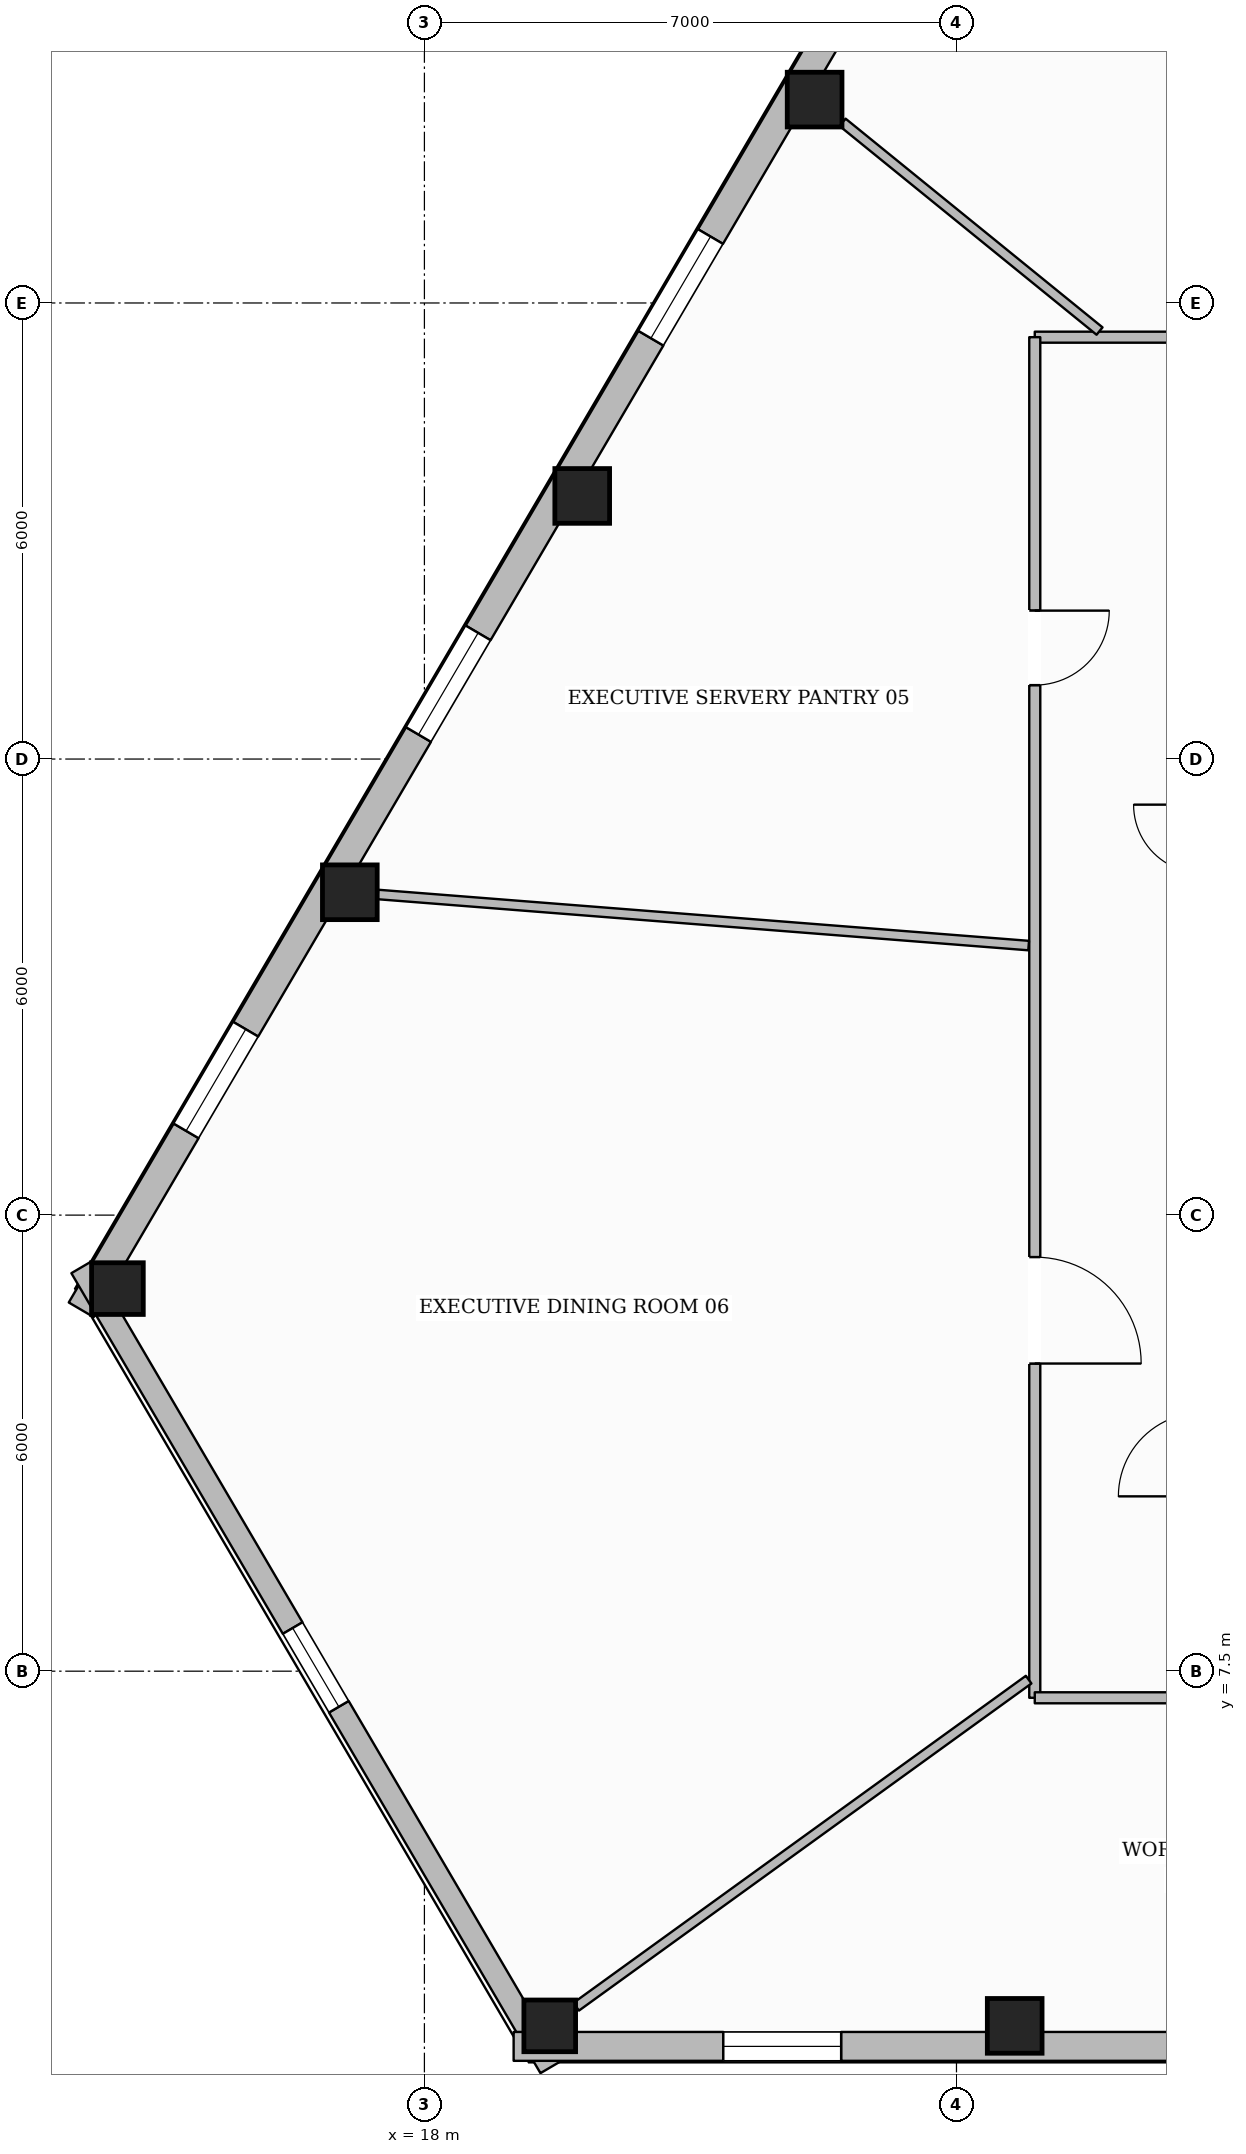
"""IFC4 building model, lengths in metres.
Left out: names, types, materials, properties, quantities, classifications, styles, units other than length and angle.
Written with IfcOpenShell. Run it as: python <this file> out.ifc"""

import sys

from ifc_helpers import new_model, si_unit, direction, frame, frame_2d, origin, origin_2d, place, context, subcontext, project, spatial, rectangle, hollow_rectangle, extrude, element, fill, save


model = new_model("IFC4")
c1 = context("Model", 3, precision=1e-05, world=origin(), true_north=direction((0.0, 1.0)))
c2 = subcontext(c1, "Body", "Model", "MODEL_VIEW")
j1 = project(units=[si_unit("LENGTHUNIT", "METRE"), si_unit("PLANEANGLEUNIT", "RADIAN")], contexts=[c1])
p1 = place(None, origin())
s1 = spatial("IfcSite", under=j1, at=p1, CompositionType="ELEMENT")
p2 = place(p1, origin())
s2 = spatial("IfcBuilding", under=s1, at=p2, CompositionType="ELEMENT")
p3 = place(p2, frame((0.0, 0.0, 131.7)))
s3 = spatial("IfcBuildingStorey", under=s2, at=p3, CompositionType="ELEMENT", Elevation=131.7)
for number, where, z_axis, x_axis in (
    (1, (23.134, 28.176, 0.0), (0.0, 0.0, 1.0), (1.0, 0.0, 0.0)),
    (2, (20.076, 22.961, 0.0), (0.0, 0.0, 1.0), (1.0, 0.0, 0.0)),
    (3, (17.019, 17.747, 0.0), (0.0, 0.0, 1.0), (1.0, 0.0, 0.0)),
):
    element("IfcColumn", number, at=place(p3, frame(where, z_axis=z_axis, x_axis=x_axis)), inside=s3, PredefinedType="COLUMN", context=c2, shape_type="SweptSolid", body=[
        extrude(hollow_rectangle(XDim=0.72, YDim=0.72, WallThickness=0.032, at=origin_2d()), origin(), (0.0, 0.0, 1.0), 3.6),
    ])
for number, where, z_axis, x_axis in (
    (4, (13.961, 12.533, 0.0), (0.0, 0.0, 1.0), (1.0, 0.0, 0.0)),
    (5, (19.649, 2.834, 0.0), (0.0, 0.0, 1.0), (1.0, 0.0, 0.0)),
):
    element("IfcColumn", number, at=place(p3, frame(where, z_axis=z_axis, x_axis=x_axis)), inside=s3, PredefinedType="COLUMN", context=c2, shape_type="SweptSolid", body=[
        extrude(hollow_rectangle(XDim=0.68, YDim=0.68, WallThickness=0.03, at=origin_2d()), origin(), (0.0, 0.0, 1.0), 3.6),
    ])
p4 = place(p3, frame((25.766, 2.834, 0.0), z_axis=(0.0, 0.0, 1.0), x_axis=(1.0, 0.0, 0.0)))
e6 = element("IfcColumn", 6, at=p4, inside=s3, PredefinedType="COLUMN", context=c2, shape_type="SweptSolid", body=[
    extrude(hollow_rectangle(XDim=0.72, YDim=0.72, WallThickness=0.032, at=origin_2d()), origin(), (0.0, 0.0, 1.0), 3.6),
])
p5 = place(p3, frame((13.485, 12.254, 0.0), z_axis=(0.0, 0.0, 1.0), x_axis=(0.505829244079, 0.862633627813, 0.0)))
e7 = element("IfcWall", 7, at=p5, inside=s3, PredefinedType="STANDARD", context=c2, shape_type="SweptSolid", body=[
    extrude(rectangle(XDim=37.223, YDim=0.38, at=frame_2d((18.611, 0.0))), origin(), (0.0, 0.0, 1.0), 3.059),
])
p6 = place(p5, frame((32.951, 0.0, 0.65)))
e8 = element("IfcOpeningElement", 8, at=p6, cuts=e7, PredefinedType="OPENING", context=c2, shape_type="SweptSolid", body=[
    extrude(rectangle(XDim=1.55, YDim=1.75, at=frame_2d((0.775, 0.875))), frame((0.0, 0.2, 0.0), z_axis=(0.0, -1.0, 0.0), x_axis=(1.0, 0.0, 0.0)), (0.0, 0.0, 1.0), 0.4),
])
p7 = place(p5, frame((26.906, 0.0, 0.65)))
e9 = element("IfcOpeningElement", 9, at=p7, cuts=e7, PredefinedType="OPENING", context=c2, shape_type="SweptSolid", body=[
    extrude(rectangle(XDim=1.55, YDim=1.75, at=frame_2d((0.775, 0.875))), frame((0.0, 0.2, 0.0), z_axis=(0.0, -1.0, 0.0), x_axis=(1.0, 0.0, 0.0)), (0.0, 0.0, 1.0), 0.4),
])
p8 = place(p5, frame((14.817, 0.0, 0.65)))
e10 = element("IfcOpeningElement", 10, at=p8, cuts=e7, PredefinedType="OPENING", context=c2, shape_type="SweptSolid", body=[
    extrude(rectangle(XDim=1.55, YDim=1.75, at=frame_2d((0.775, 0.875))), frame((0.0, 0.2, 0.0), z_axis=(0.0, -1.0, 0.0), x_axis=(1.0, 0.0, 0.0)), (0.0, 0.0, 1.0), 0.4),
])
p9 = place(p5, frame((8.773, 0.0, 0.65)))
e11 = element("IfcOpeningElement", 11, at=p9, cuts=e7, PredefinedType="OPENING", context=c2, shape_type="SweptSolid", body=[
    extrude(rectangle(XDim=1.55, YDim=1.75, at=frame_2d((0.775, 0.875))), frame((0.0, 0.2, 0.0), z_axis=(0.0, -1.0, 0.0), x_axis=(1.0, 0.0, 0.0)), (0.0, 0.0, 1.0), 0.4),
])
p10 = place(p5, frame((2.729, 0.0, 0.65)))
e12 = element("IfcOpeningElement", 12, at=p10, cuts=e7, PredefinedType="OPENING", context=c2, shape_type="SweptSolid", body=[
    extrude(rectangle(XDim=1.55, YDim=1.75, at=frame_2d((0.775, 0.875))), frame((0.0, 0.2, 0.0), z_axis=(0.0, -1.0, 0.0), x_axis=(1.0, 0.0, 0.0)), (0.0, 0.0, 1.0), 0.4),
])
p11 = place(p3, frame((19.656, 2.288, 0.0), z_axis=(0.0, 0.0, 1.0), x_axis=(-0.505835558362, 0.862629925227, 0.0)))
e13 = element("IfcWall", 13, at=p11, inside=s3, PredefinedType="STANDARD", context=c2, shape_type="SweptSolid", body=[
    extrude(rectangle(XDim=12.2, YDim=0.3, at=frame_2d((6.1, 0.0))), origin(), (0.0, 0.0, 1.0), 3.059),
])
p12 = place(p11, frame((5.5, 0.0, 0.65)))
e14 = element("IfcOpeningElement", 14, at=p12, cuts=e13, PredefinedType="OPENING", context=c2, shape_type="SweptSolid", body=[
    extrude(rectangle(XDim=1.2, YDim=1.7, at=frame_2d((0.6, 0.85))), frame((0.0, 0.16, 0.0), z_axis=(0.0, -1.0, 0.0), x_axis=(1.0, 0.0, 0.0)), (0.0, 0.0, 1.0), 0.32),
])
p13 = place(p3, frame((56.826, 2.564, 0.0), z_axis=(0.0, 0.0, 1.0), x_axis=(-1.0, 0.0, 0.0)))
e15 = element("IfcWall", 15, at=p13, inside=s3, PredefinedType="STANDARD", context=c2, shape_type="SweptSolid", body=[
    extrude(rectangle(XDim=37.652, YDim=0.38, at=frame_2d((18.826, 0.0))), origin(), (0.0, 0.0, 1.0), 3.059),
])
p14 = place(p13, frame((33.344, 0.0, 0.65)))
e16 = element("IfcOpeningElement", 16, at=p14, cuts=e15, PredefinedType="OPENING", context=c2, shape_type="SweptSolid", body=[
    extrude(rectangle(XDim=1.55, YDim=1.75, at=frame_2d((0.775, 0.875))), frame((0.0, 0.2, 0.0), z_axis=(0.0, -1.0, 0.0), x_axis=(1.0, 0.0, 0.0)), (0.0, 0.0, 1.0), 0.4),
])
p15 = place(p13, frame((27.227, 0.0, 0.65)))
e17 = element("IfcOpeningElement", 17, at=p15, cuts=e15, PredefinedType="OPENING", context=c2, shape_type="SweptSolid", body=[
    extrude(rectangle(XDim=1.55, YDim=1.75, at=frame_2d((0.775, 0.875))), frame((0.0, 0.2, 0.0), z_axis=(0.0, -1.0, 0.0), x_axis=(1.0, 0.0, 0.0)), (0.0, 0.0, 1.0), 0.4),
])
p16 = place(p13, frame((14.993, 0.0, 0.65)))
e18 = element("IfcOpeningElement", 18, at=p16, cuts=e15, PredefinedType="OPENING", context=c2, shape_type="SweptSolid", body=[
    extrude(rectangle(XDim=1.55, YDim=1.75, at=frame_2d((0.775, 0.875))), frame((0.0, 0.2, 0.0), z_axis=(0.0, -1.0, 0.0), x_axis=(1.0, 0.0, 0.0)), (0.0, 0.0, 1.0), 0.4),
])
p17 = place(p13, frame((8.875, 0.0, 0.65)))
e19 = element("IfcOpeningElement", 19, at=p17, cuts=e15, PredefinedType="OPENING", context=c2, shape_type="SweptSolid", body=[
    extrude(rectangle(XDim=1.55, YDim=1.75, at=frame_2d((0.775, 0.875))), frame((0.0, 0.2, 0.0), z_axis=(0.0, -1.0, 0.0), x_axis=(1.0, 0.0, 0.0)), (0.0, 0.0, 1.0), 0.4),
])
p18 = place(p13, frame((2.759, 0.0, 0.65)))
e20 = element("IfcOpeningElement", 20, at=p18, cuts=e15, PredefinedType="OPENING", context=c2, shape_type="SweptSolid", body=[
    extrude(rectangle(XDim=1.55, YDim=1.75, at=frame_2d((0.775, 0.875))), frame((0.0, 0.2, 0.0), z_axis=(0.0, -1.0, 0.0), x_axis=(1.0, 0.0, 0.0)), (0.0, 0.0, 1.0), 0.4),
])
p19 = place(p3, frame((49.97, 25.05, 0.0), z_axis=(0.0, 0.0, 1.0), x_axis=(-1.0, 0.0, 0.0)))
e21 = element("IfcWall", 21, at=p19, inside=s3, PredefinedType="PARTITIONING", context=c2, shape_type="SweptSolid", body=[
    extrude(rectangle(XDim=23.94, YDim=0.145, at=frame_2d((11.97, 0.0))), origin(), (0.0, 0.0, 1.0), 3.6),
])
p20 = place(p19, frame((14.53, 0.0, 0.0)))
e22 = element("IfcOpeningElement", 22, at=p20, cuts=e21, PredefinedType="OPENING", context=c2, shape_type="SweptSolid", body=[
    extrude(rectangle(XDim=0.88, YDim=2.1, at=frame_2d((0.44, 1.05))), frame((0.0, 0.083, 0.0), z_axis=(0.0, -1.0, 0.0), x_axis=(1.0, 0.0, 0.0)), (0.0, 0.0, 1.0), 0.165),
])
p21 = place(p19, frame((12.01, 0.0, 0.0)))
e23 = element("IfcOpeningElement", 23, at=p21, cuts=e21, PredefinedType="OPENING", context=c2, shape_type="SweptSolid", body=[
    extrude(rectangle(XDim=0.88, YDim=2.1, at=frame_2d((0.44, 1.05))), frame((0.0, 0.083, 0.0), z_axis=(0.0, -1.0, 0.0), x_axis=(1.0, 0.0, 0.0)), (0.0, 0.0, 1.0), 0.165),
])
p22 = place(p19, frame((9.55, 0.0, 0.0)))
e24 = element("IfcOpeningElement", 24, at=p22, cuts=e21, PredefinedType="OPENING", context=c2, shape_type="SweptSolid", body=[
    extrude(rectangle(XDim=0.96, YDim=2.1, at=frame_2d((0.48, 1.05))), frame((0.0, 0.083, 0.0), z_axis=(0.0, -1.0, 0.0), x_axis=(1.0, 0.0, 0.0)), (0.0, 0.0, 1.0), 0.165),
])
p23 = place(p19, frame((2.292, 0.0, 0.0)))
e25 = element("IfcOpeningElement", 25, at=p23, cuts=e21, PredefinedType="OPENING", context=c2, shape_type="SweptSolid", body=[
    extrude(rectangle(XDim=0.98, YDim=2.15, at=frame_2d((0.49, 1.075))), frame((0.0, 0.083, 0.0), z_axis=(0.0, -1.0, 0.0), x_axis=(1.0, 0.0, 0.0)), (0.0, 0.0, 1.0), 0.165),
])
p24 = place(p19, frame((6.668, 0.0, 0.0)))
e26 = element("IfcOpeningElement", 26, at=p24, cuts=e21, PredefinedType="OPENING", context=c2, shape_type="SweptSolid", body=[
    extrude(rectangle(XDim=1.4, YDim=2.2, at=frame_2d((0.7, 1.1))), frame((0.0, 0.083, 0.0), z_axis=(0.0, -1.0, 0.0), x_axis=(1.0, 0.0, 0.0)), (0.0, 0.0, 1.0), 0.165),
])
p25 = place(p19, frame((18.901, 0.0, 0.0)))
e27 = element("IfcOpeningElement", 27, at=p25, cuts=e21, PredefinedType="OPENING", context=c2, shape_type="SweptSolid", body=[
    extrude(rectangle(XDim=1.4, YDim=2.2, at=frame_2d((0.7, 1.1))), frame((0.0, 0.083, 0.0), z_axis=(0.0, -1.0, 0.0), x_axis=(1.0, 0.0, 0.0)), (0.0, 0.0, 1.0), 0.165),
])
p26 = place(p3, frame((26.03, 25.05, 0.0), z_axis=(0.0, 0.0, 1.0), x_axis=(0.0, -1.0, 0.0)))
e28 = element("IfcWall", 28, at=p26, inside=s3, PredefinedType="PARTITIONING", context=c2, shape_type="SweptSolid", body=[
    extrude(rectangle(XDim=17.9, YDim=0.145, at=frame_2d((8.95, 0.0))), origin(), (0.0, 0.0, 1.0), 3.288),
])
p27 = place(p26, frame((3.597, 0.0, 0.0)))
e29 = element("IfcOpeningElement", 29, at=p27, cuts=e28, PredefinedType="OPENING", context=c2, shape_type="SweptSolid", body=[
    extrude(rectangle(XDim=0.98, YDim=2.15, at=frame_2d((0.49, 1.075))), frame((0.0, 0.083, 0.0), z_axis=(0.0, -1.0, 0.0), x_axis=(1.0, 0.0, 0.0)), (0.0, 0.0, 1.0), 0.165),
])
p28 = place(p26, frame((12.103, 0.0, 0.0)))
e30 = element("IfcOpeningElement", 30, at=p28, cuts=e28, PredefinedType="OPENING", context=c2, shape_type="SweptSolid", body=[
    extrude(rectangle(XDim=1.4, YDim=2.2, at=frame_2d((0.7, 1.1))), frame((0.0, 0.083, 0.0), z_axis=(0.0, -1.0, 0.0), x_axis=(1.0, 0.0, 0.0)), (0.0, 0.0, 1.0), 0.165),
])
p29 = place(p3, frame((26.03, 7.15, 0.0), z_axis=(0.0, 0.0, 1.0), x_axis=(1.0, 0.0, 0.0)))
e31 = element("IfcWall", 31, at=p29, inside=s3, PredefinedType="PARTITIONING", context=c2, shape_type="SweptSolid", body=[
    extrude(rectangle(XDim=23.94, YDim=0.145, at=frame_2d((11.97, 0.0))), origin(), (0.0, 0.0, 1.0), 3.6),
])
p30 = place(p29, frame((7.452, 0.0, 0.0)))
e32 = element("IfcOpeningElement", 32, at=p30, cuts=e31, PredefinedType="OPENING", context=c2, shape_type="SweptSolid", body=[
    extrude(rectangle(XDim=1.4, YDim=2.2, at=frame_2d((0.7, 1.1))), frame((0.0, 0.083, 0.0), z_axis=(0.0, -1.0, 0.0), x_axis=(1.0, 0.0, 0.0)), (0.0, 0.0, 1.0), 0.165),
])
p31 = place(p29, frame((19.642, 0.0, 0.0)))
e33 = element("IfcOpeningElement", 33, at=p31, cuts=e31, PredefinedType="OPENING", context=c2, shape_type="SweptSolid", body=[
    extrude(rectangle(XDim=1.02, YDim=2.15, at=frame_2d((0.51, 1.075))), frame((0.0, 0.083, 0.0), z_axis=(0.0, -1.0, 0.0), x_axis=(1.0, 0.0, 0.0)), (0.0, 0.0, 1.0), 0.165),
])
p32 = place(p3, frame((26.882, 25.131, 0.0), z_axis=(0.0, 0.0, 1.0), x_axis=(-0.776187723066, 0.630501878317, 0.0)))
e34 = element("IfcWall", 34, at=p32, inside=s3, PredefinedType="PARTITIONING", context=c2, shape_type="SweptSolid", body=[
    extrude(rectangle(XDim=4.355, YDim=0.125, at=frame_2d((2.178, 0.0))), origin(), (0.0, 0.0, 1.0), 3.141),
])
p33 = place(p3, frame((25.949, 17.046, 0.0), z_axis=(0.0, 0.0, 1.0), x_axis=(-0.996931335541, 0.078280982467, 0.0)))
e35 = element("IfcWall", 35, at=p33, inside=s3, PredefinedType="PARTITIONING", context=c2, shape_type="SweptSolid", body=[
    extrude(rectangle(XDim=8.589, YDim=0.125, at=frame_2d((4.294, 0.0))), origin(), (0.0, 0.0, 1.0), 3.141),
])
p34 = place(p3, frame((25.949, 7.389, 0.0), z_axis=(0.0, 0.0, 1.0), x_axis=(-0.810414453305, -0.585856990975, 0.0)))
e36 = element("IfcWall", 36, at=p34, inside=s3, PredefinedType="PARTITIONING", context=c2, shape_type="SweptSolid", body=[
    extrude(rectangle(XDim=7.345, YDim=0.125, at=frame_2d((3.673, 0.0))), origin(), (0.0, 0.0, 1.0), 3.141),
])
p35 = place(p8, origin())
e37 = element("IfcWindow", 37, at=p35, inside=s3, PartitioningType="SINGLE_PANEL", PredefinedType="WINDOW", context=c2, shape_type="SweptSolid", body=[
    extrude(rectangle(XDim=1.55, YDim=1.75, at=frame_2d((0.775, 0.875))), frame((0.0, 0.03, 0.0), z_axis=(0.0, -1.0, 0.0), x_axis=(1.0, 0.0, 0.0)), (0.0, 0.0, 1.0), 0.06),
])
fill(e10, e37)
p36 = place(p9, origin())
e38 = element("IfcWindow", 38, at=p36, inside=s3, PartitioningType="SINGLE_PANEL", PredefinedType="WINDOW", context=c2, shape_type="SweptSolid", body=[
    extrude(rectangle(XDim=1.55, YDim=1.75, at=frame_2d((0.775, 0.875))), frame((0.0, 0.03, 0.0), z_axis=(0.0, -1.0, 0.0), x_axis=(1.0, 0.0, 0.0)), (0.0, 0.0, 1.0), 0.06),
])
fill(e11, e38)
p37 = place(p10, origin())
e39 = element("IfcWindow", 39, at=p37, inside=s3, PartitioningType="SINGLE_PANEL", PredefinedType="WINDOW", context=c2, shape_type="SweptSolid", body=[
    extrude(rectangle(XDim=1.55, YDim=1.75, at=frame_2d((0.775, 0.875))), frame((0.0, 0.03, 0.0), z_axis=(0.0, -1.0, 0.0), x_axis=(1.0, 0.0, 0.0)), (0.0, 0.0, 1.0), 0.06),
])
fill(e12, e39)
p38 = place(p14, origin())
e40 = element("IfcWindow", 40, at=p38, inside=s3, PartitioningType="SINGLE_PANEL", PredefinedType="WINDOW", context=c2, shape_type="SweptSolid", body=[
    extrude(rectangle(XDim=1.55, YDim=1.75, at=frame_2d((0.775, 0.875))), frame((0.0, 0.03, 0.0), z_axis=(0.0, -1.0, 0.0), x_axis=(1.0, 0.0, 0.0)), (0.0, 0.0, 1.0), 0.06),
])
fill(e16, e40)
p39 = place(p12, origin())
e41 = element("IfcWindow", 41, at=p39, inside=s3, PartitioningType="SINGLE_PANEL", PredefinedType="WINDOW", context=c2, shape_type="SweptSolid", body=[
    extrude(rectangle(XDim=1.2, YDim=1.7, at=frame_2d((0.6, 0.85))), frame((0.0, 0.03, 0.0), z_axis=(0.0, -1.0, 0.0), x_axis=(1.0, 0.0, 0.0)), (0.0, 0.0, 1.0), 0.06),
])
fill(e14, e41)
p40 = place(p27, origin())
e42 = element("IfcDoor", 42, at=p40, inside=s3, OperationType="SINGLE_SWING_LEFT", PredefinedType="DOOR", context=c2, shape_type="SweptSolid", body=[
    extrude(rectangle(XDim=0.98, YDim=2.15, at=frame_2d((0.49, 1.075))), frame((0.0, 0.025, 0.0), z_axis=(0.0, -1.0, 0.0), x_axis=(1.0, 0.0, 0.0)), (0.0, 0.0, 1.0), 0.05),
])
fill(e29, e42)
p41 = place(p28, origin())
e43 = element("IfcDoor", 43, at=p41, inside=s3, OperationType="SINGLE_SWING_RIGHT", PredefinedType="DOOR", context=c2, shape_type="SweptSolid", body=[
    extrude(rectangle(XDim=1.4, YDim=2.2, at=frame_2d((0.7, 1.1))), frame((0.0, 0.025, 0.0), z_axis=(0.0, -1.0, 0.0), x_axis=(1.0, 0.0, 0.0)), (0.0, 0.0, 1.0), 0.05),
])
fill(e30, e43)
save(model, sys.argv[1])
